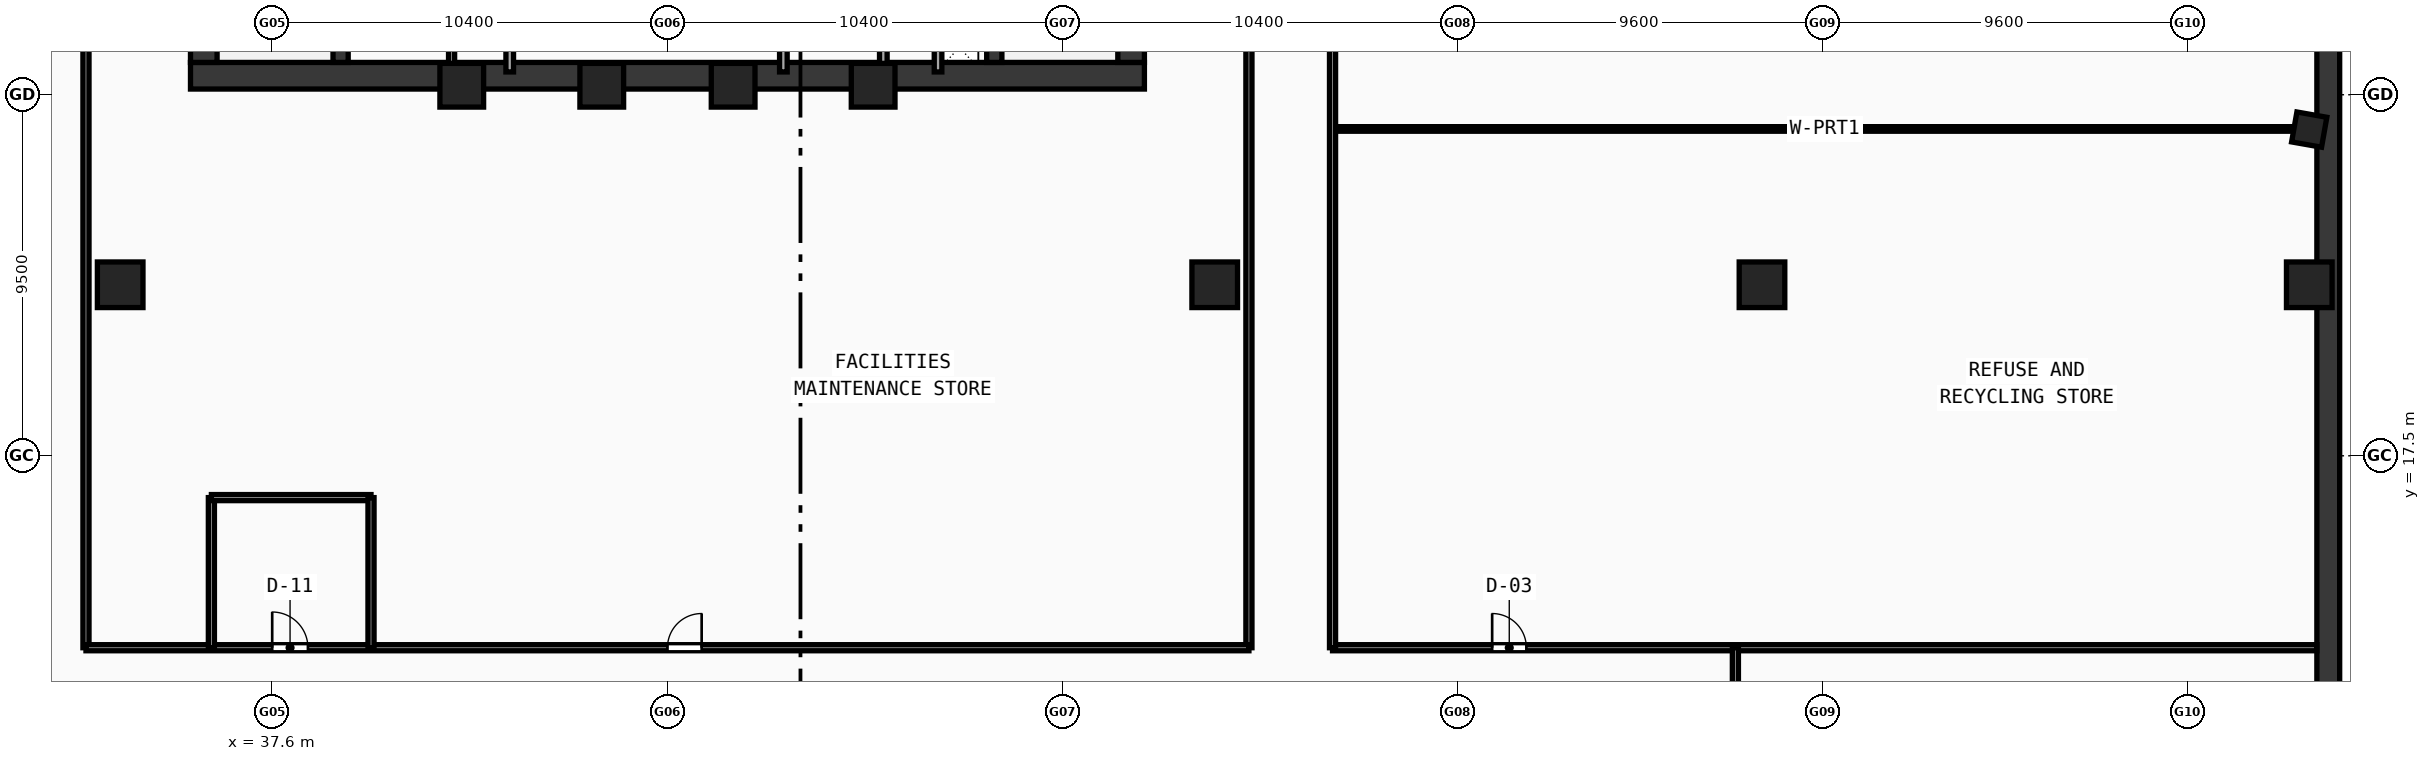
"""IFC4 building model, lengths in metres.
Left out: names, types, materials, properties, quantities, classifications, styles, units other than length and angle.
Written with IfcOpenShell. Run it as: python <this file> out.ifc"""

import sys

from ifc_helpers import new_model, si_unit, direction, frame, frame_2d, origin, origin_with_axes, origin_2d, place, context, subcontext, project, spatial, rectangle, hollow_rectangle, extrude, source, transform, mapped, element, fill, save


model = new_model("IFC4")
c1 = context("Model", 3, precision=1e-05, world=origin(), true_north=direction((0.0, 1.0)))
c2 = subcontext(c1, "Body", "Model", "MODEL_VIEW")
j1 = project(units=[si_unit("LENGTHUNIT", "METRE"), si_unit("PLANEANGLEUNIT", "RADIAN")], contexts=[c1])
p1 = place(None, origin())
s1 = spatial("IfcSite", under=j1, at=p1, CompositionType="ELEMENT")
p2 = place(p1, origin())
s2 = spatial("IfcBuilding", under=s1, at=p2, CompositionType="ELEMENT")
p3 = place(p2, frame((0.0, 0.0, -4.8)))
s3 = spatial("IfcBuildingStorey", under=s2, at=p3, CompositionType="ELEMENT", Elevation=-4.8)
p4 = place(p3, frame((91.7, 6.6, 0.0), z_axis=(0.0, 0.0, 1.0), x_axis=(0.0, 1.0, 0.0)))
e1 = element("IfcWall", 1, at=p4, inside=s3, PredefinedType="SHEAR", context=c2, shape_type="SweptSolid", body=[
    extrude(rectangle(XDim=82.8, YDim=0.6, at=frame_2d((41.4, 0.0))), origin(), (0.0, 0.0, 1.0), 4.52),
])
p5 = place(p3, frame((35.45, 27.5, 0.0), z_axis=(0.0, 0.0, 1.0), x_axis=(1.0, 0.0, 0.0)))
e2 = element("IfcWall", 2, at=p5, inside=s3, PredefinedType="SHEAR", context=c2, shape_type="SweptSolid", body=[
    extrude(rectangle(XDim=25.1, YDim=0.7, at=frame_2d((12.55, 0.0))), origin(), (0.0, 0.0, 1.0), 4.52),
])
for number, where, z_axis, x_axis in (
    (3, (35.8, 27.85, 0.0), (0.0, 0.0, 1.0), (0.0, 1.0, 0.0)),
    (4, (60.2, 27.85, 0.0), (0.0, 0.0, 1.0), (0.0, 1.0, 0.0)),
):
    element("IfcWall", number, at=place(p3, frame(where, z_axis=z_axis, x_axis=x_axis)), inside=s3, PredefinedType="SHEAR", context=c2, shape_type="SweptSolid", body=[
        extrude(rectangle(XDim=12.0, YDim=0.7, at=frame_2d((6.0, 0.0))), origin(), (0.0, 0.0, 1.0), 4.52),
    ])
p6 = place(p3, frame((39.4, 27.85, 0.0), z_axis=(0.0, 0.0, 1.0), x_axis=(0.0, 1.0, 0.0)))
e5 = element("IfcWall", 5, at=p6, inside=s3, PredefinedType="SHEAR", context=c2, shape_type="SweptSolid", body=[
    extrude(rectangle(XDim=12.0, YDim=0.4, at=frame_2d((6.0, 0.0))), origin(), (0.0, 0.0, 1.0), 4.52),
])
p7 = place(p6, frame((9.9, 0.0, 0.0)))
e6 = element("IfcOpeningElement", 6, at=p7, cuts=e5, PredefinedType="OPENING", context=c2, shape_type="SweptSolid", body=[
    extrude(rectangle(XDim=1.1, YDim=2.1, at=frame_2d((0.55, 1.05))), frame((0.0, 0.21, 0.0), z_axis=(0.0, -1.0, 0.0), x_axis=(1.0, 0.0, 0.0)), (0.0, 0.0, 1.0), 0.42),
])
p8 = place(p3, frame((56.6, 27.85, 0.0), z_axis=(0.0, 0.0, 1.0), x_axis=(0.0, 1.0, 0.0)))
e7 = element("IfcWall", 7, at=p8, inside=s3, PredefinedType="SHEAR", context=c2, shape_type="SweptSolid", body=[
    extrude(rectangle(XDim=12.0, YDim=0.4, at=frame_2d((6.0, 0.0))), origin(), (0.0, 0.0, 1.0), 4.52),
])
p9 = place(p8, frame((9.9, 0.0, 0.0)))
e8 = element("IfcOpeningElement", 8, at=p9, cuts=e7, PredefinedType="OPENING", context=c2, shape_type="SweptSolid", body=[
    extrude(rectangle(XDim=1.1, YDim=2.1, at=frame_2d((0.55, 1.05))), frame((0.0, 0.21, 0.0), z_axis=(0.0, -1.0, 0.0), x_axis=(1.0, 0.0, 0.0)), (0.0, 0.0, 1.0), 0.42),
])
m1 = source(origin(), c2, "Body", "SweptSolid", [
    extrude(hollow_rectangle(XDim=1.15, YDim=1.15, WallThickness=0.048, at=origin_2d()), origin(), (0.0, 0.0, 1.0), 4.82),
])
for number, where, z_axis, x_axis in (
    (9, (42.588, 27.25, -0.3), (0.0, 0.0, 1.0), (1.0, 0.0, 0.0)),
    (10, (46.272, 27.25, -0.3), (0.0, 0.0, 1.0), (1.0, 0.0, 0.0)),
    (11, (49.729, 27.25, -0.3), (0.0, 0.0, 1.0), (1.0, 0.0, 0.0)),
    (12, (53.412, 27.25, -0.3), (0.0, 0.0, 1.0), (1.0, 0.0, 0.0)),
):
    element("IfcColumn", number, at=place(p3, frame(where, z_axis=z_axis, x_axis=x_axis)), inside=s3, PredefinedType="COLUMN", context=c2, shape_type="MappedRepresentation", body=[
        mapped(m1, transform((0.0, 0.0, 0.0), scale=1.0)),
    ])
m2 = source(origin(), c2, "Body", "SweptSolid", [
    extrude(hollow_rectangle(XDim=1.2, YDim=1.2, WallThickness=0.05, at=origin_2d()), origin(), (0.0, 0.0, 1.0), 4.82),
])
for number, where, z_axis, x_axis in (
    (13, (33.6, 22.0, -0.3), (0.0, 0.0, 1.0), (1.0, 0.0, 0.0)),
    (14, (62.4, 22.0, -0.3), (0.0, 0.0, 1.0), (1.0, 0.0, 0.0)),
    (15, (76.8, 22.0, -0.3), (0.0, 0.0, 1.0), (1.0, 0.0, 0.0)),
    (16, (91.2, 22.0, -0.3), (0.0, 0.0, 1.0), (1.0, 0.0, 0.0)),
):
    element("IfcColumn", number, at=place(p3, frame(where, z_axis=z_axis, x_axis=x_axis)), inside=s3, PredefinedType="COLUMN", context=c2, shape_type="MappedRepresentation", body=[
        mapped(m2, transform((0.0, 0.0, 0.0), scale=1.0)),
    ])
m3 = source(origin(), c2, "Body", "SweptSolid", [
    extrude(hollow_rectangle(XDim=0.8, YDim=0.8, WallThickness=0.032, at=origin_2d()), origin(), (0.0, 0.0, 1.0), 4.82),
])
p10 = place(p3, frame((91.199, 26.083, -0.3), z_axis=(0.0, 0.0, 1.0), x_axis=(0.173648177667, 0.984807753012, 0.0)))
e17 = element("IfcColumn", 17, at=p10, inside=s3, PredefinedType="COLUMN", context=c2, shape_type="MappedRepresentation", body=[
    mapped(m3, transform((0.0, 0.0, 0.0), scale=1.0)),
])
p11 = place(p3, frame((43.85, 27.6, 0.0), z_axis=(0.0, 0.0, 1.0), x_axis=(0.0, 1.0, 0.0)))
e18 = element("IfcWall", 18, at=p11, inside=s3, PredefinedType="SOLIDWALL", context=c2, shape_type="SweptSolid", body=[
    extrude(rectangle(XDim=6.22, YDim=0.2, at=frame_2d((3.11, 0.0))), origin(), (0.0, 0.0, 1.0), 4.52),
])
p12 = place(p11, frame((2.25, 0.0, 0.0)))
e19 = element("IfcOpeningElement", 19, at=p12, cuts=e18, PredefinedType="OPENING", context=c2, shape_type="SweptSolid", body=[
    extrude(rectangle(XDim=1.05, YDim=2.1, at=frame_2d((0.525, 1.05))), frame((0.0, 0.11, 0.0), z_axis=(0.0, -1.0, 0.0), x_axis=(1.0, 0.0, 0.0)), (0.0, 0.0, 1.0), 0.22),
])
p13 = place(p3, frame((53.68, 27.6, 0.0), z_axis=(0.0, 0.0, 1.0), x_axis=(0.0, 1.0, 0.0)))
e20 = element("IfcWall", 20, at=p13, inside=s3, PredefinedType="SOLIDWALL", context=c2, shape_type="SweptSolid", body=[
    extrude(rectangle(XDim=9.05, YDim=0.2, at=frame_2d((4.525, 0.0))), origin(), (0.0, 0.0, 1.0), 4.52),
])
p14 = place(p13, frame((6.9, 0.0, 0.0)))
e21 = element("IfcOpeningElement", 21, at=p14, cuts=e20, PredefinedType="OPENING", context=c2, shape_type="SweptSolid", body=[
    extrude(rectangle(XDim=1.05, YDim=2.1, at=frame_2d((0.525, 1.05))), frame((0.0, 0.11, 0.0), z_axis=(0.0, -1.0, 0.0), x_axis=(1.0, 0.0, 0.0)), (0.0, 0.0, 1.0), 0.22),
])
for number, where, z_axis, x_axis in (
    (22, (51.05, 27.6, 0.0), (0.0, 0.0, 1.0), (0.0, 1.0, 0.0)),
    (23, (55.12, 27.6, 0.0), (0.0, 0.0, 1.0), (0.0, 1.0, 0.0)),
):
    element("IfcWall", number, at=place(p3, frame(where, z_axis=z_axis, x_axis=x_axis)), inside=s3, PredefinedType="SOLIDWALL", context=c2, shape_type="SweptSolid", body=[
        extrude(rectangle(XDim=2.12, YDim=0.2, at=frame_2d((1.06, 0.0))), origin(), (0.0, 0.0, 1.0), 4.52),
    ])
p15 = place(p3, frame((42.32, 27.6, 0.0), z_axis=(0.0, 0.0, 1.0), x_axis=(0.0, 1.0, 0.0)))
e24 = element("IfcWall", 24, at=p15, inside=s3, PredefinedType="PARTITIONING", context=c2, shape_type="SweptSolid", body=[
    extrude(rectangle(XDim=5.9, YDim=0.16, at=frame_2d((2.95, 0.0))), origin(), (0.0, 0.0, 1.0), 4.52),
])
p16 = place(p15, frame((1.1, 0.0, 0.0)))
e25 = element("IfcOpeningElement", 25, at=p16, cuts=e24, PredefinedType="OPENING", context=c2, shape_type="SweptSolid", body=[
    extrude(rectangle(XDim=0.9, YDim=2.1, at=frame_2d((0.45, 1.05))), frame((0.0, 0.09, 0.0), z_axis=(0.0, -1.0, 0.0), x_axis=(1.0, 0.0, 0.0)), (0.0, 0.0, 1.0), 0.18),
])
p17 = place(p15, frame((3.6, 0.0, 0.0)))
e26 = element("IfcOpeningElement", 26, at=p17, cuts=e24, PredefinedType="OPENING", context=c2, shape_type="SweptSolid", body=[
    extrude(rectangle(XDim=0.9, YDim=2.1, at=frame_2d((0.45, 1.05))), frame((0.0, 0.09, 0.0), z_axis=(0.0, -1.0, 0.0), x_axis=(1.0, 0.0, 0.0)), (0.0, 0.0, 1.0), 0.18),
])
p18 = place(p3, frame((65.5, 26.1, 0.0), z_axis=(0.0, 0.0, 1.0), x_axis=(1.0, 0.0, 0.0)))
e27 = element("IfcWall", 27, at=p18, inside=s3, PredefinedType="PARTITIONING", context=c2, shape_type="SweptSolid", body=[
    extrude(rectangle(XDim=25.9, YDim=0.12, at=frame_2d((12.95, 0.0))), origin(), (0.0, 0.0, 1.0), 3.62),
])
p19 = place(p3, frame((65.5, 12.45, 0.0), z_axis=(0.0, 0.0, 1.0), x_axis=(1.0, 0.0, 0.0)))
e28 = element("IfcWall", 28, at=p19, inside=s3, PredefinedType="PARTITIONING", context=c2, shape_type="SweptSolid", body=[
    extrude(rectangle(XDim=25.9, YDim=0.16, at=frame_2d((12.95, 0.0))), origin(), (0.0, 0.0, 1.0), 3.62),
])
p20 = place(p19, frame((4.2, 0.0, 0.0)))
e29 = element("IfcOpeningElement", 29, at=p20, cuts=e28, PredefinedType="OPENING", context=c2, shape_type="SweptSolid", body=[
    extrude(rectangle(XDim=0.9, YDim=2.1, at=frame_2d((0.45, 1.05))), frame((0.0, 0.09, 0.0), z_axis=(0.0, -1.0, 0.0), x_axis=(1.0, 0.0, 0.0)), (0.0, 0.0, 1.0), 0.18),
])
for number, where, z_axis, x_axis in (
    (30, (65.5, 12.45, 0.0), (0.0, 0.0, 1.0), (0.0, 1.0, 0.0)),
    (31, (32.7, 12.45, 0.0), (0.0, 0.0, 1.0), (0.0, 1.0, 0.0)),
    (32, (63.3, 12.45, 0.0), (0.0, 0.0, 1.0), (0.0, 1.0, 0.0)),
):
    element("IfcWall", number, at=place(p3, frame(where, z_axis=z_axis, x_axis=x_axis)), inside=s3, PredefinedType="PARTITIONING", context=c2, shape_type="SweptSolid", body=[
        extrude(rectangle(XDim=26.77, YDim=0.16, at=frame_2d((13.385, 0.0))), origin(), (0.0, 0.0, 1.0), 3.62),
    ])
p21 = place(p3, frame((32.7, 12.45, 0.0), z_axis=(0.0, 0.0, 1.0), x_axis=(1.0, 0.0, 0.0)))
e33 = element("IfcWall", 33, at=p21, inside=s3, PredefinedType="PARTITIONING", context=c2, shape_type="SweptSolid", body=[
    extrude(rectangle(XDim=30.6, YDim=0.16, at=frame_2d((15.3, 0.0))), origin(), (0.0, 0.0, 1.0), 3.62),
])
p22 = place(p21, frame((4.9, 0.0, 0.0)))
e34 = element("IfcOpeningElement", 34, at=p22, cuts=e33, PredefinedType="OPENING", context=c2, shape_type="SweptSolid", body=[
    extrude(rectangle(XDim=0.94, YDim=2.1, at=frame_2d((0.47, 1.05))), frame((0.0, 0.09, 0.0), z_axis=(0.0, -1.0, 0.0), x_axis=(1.0, 0.0, 0.0)), (0.0, 0.0, 1.0), 0.18),
])
p23 = place(p21, frame((15.3, 0.0, 0.0)))
e35 = element("IfcOpeningElement", 35, at=p23, cuts=e33, PredefinedType="OPENING", context=c2, shape_type="SweptSolid", body=[
    extrude(rectangle(XDim=0.9, YDim=2.1, at=frame_2d((0.45, 1.05))), frame((0.0, 0.09, 0.0), z_axis=(0.0, -1.0, 0.0), x_axis=(1.0, 0.0, 0.0)), (0.0, 0.0, 1.0), 0.18),
])
p24 = place(p3, frame((36.0, 12.45, 0.0), z_axis=(0.0, 0.0, 1.0), x_axis=(0.0, 1.0, 0.0)))
e36 = element("IfcWall", 36, at=p24, inside=s3, PredefinedType="PARTITIONING", context=c2, shape_type="SweptSolid", body=[
    extrude(rectangle(XDim=3.95, YDim=0.16, at=frame_2d((1.975, 0.0))), origin(), (0.0, 0.0, 1.0), 4.12),
])
p25 = place(p3, frame((36.0, 16.4, 0.0), z_axis=(0.0, 0.0, 1.0), x_axis=(1.0, 0.0, 0.0)))
e37 = element("IfcWall", 37, at=p25, inside=s3, PredefinedType="PARTITIONING", context=c2, shape_type="SweptSolid", body=[
    extrude(rectangle(XDim=4.2, YDim=0.16, at=frame_2d((2.1, 0.0))), origin(), (0.0, 0.0, 1.0), 4.52),
])
p26 = place(p3, frame((40.2, 12.45, 0.0), z_axis=(0.0, 0.0, 1.0), x_axis=(0.0, 1.0, 0.0)))
e38 = element("IfcWall", 38, at=p26, inside=s3, PredefinedType="PARTITIONING", context=c2, shape_type="SweptSolid", body=[
    extrude(rectangle(XDim=3.95, YDim=0.16, at=frame_2d((1.975, 0.0))), origin(), (0.0, 0.0, 1.0), 4.12),
])
p27 = place(p3, frame((76.1, 10.35, 0.0), z_axis=(0.0, 0.0, 1.0), x_axis=(0.0, 1.0, 0.0)))
e39 = element("IfcWall", 39, at=p27, inside=s3, PredefinedType="PARTITIONING", context=c2, shape_type="SweptSolid", body=[
    extrude(rectangle(XDim=2.1, YDim=0.16, at=frame_2d((1.05, 0.0))), origin(), (0.0, 0.0, 1.0), 4.52),
])
m4 = source(origin(), c2, "Body", "SweptSolid", [
    extrude(rectangle(XDim=0.9, YDim=2.1, at=frame_2d((0.45, 1.05))), frame((0.0, 0.025, 0.0), z_axis=(0.0, -1.0, 0.0), x_axis=(1.0, 0.0, 0.0)), (0.0, 0.0, 1.0), 0.05),
])
p28 = place(p20, origin_with_axes())
e40 = element("IfcDoor", 40, at=p28, inside=s3, OperationType="SINGLE_SWING_LEFT", PredefinedType="DOOR", context=c2, shape_type="MappedRepresentation", body=[
    mapped(m4, transform((0.0, 0.0, 0.0), scale=1.0)),
])
fill(e29, e40)
m5 = source(origin(), c2, "Body", "SweptSolid", [
    extrude(rectangle(XDim=0.94, YDim=2.1, at=frame_2d((0.47, 1.05))), frame((0.0, 0.025, 0.0), z_axis=(0.0, -1.0, 0.0), x_axis=(1.0, 0.0, 0.0)), (0.0, 0.0, 1.0), 0.05),
])
p29 = place(p22, origin_with_axes())
e41 = element("IfcDoor", 41, at=p29, inside=s3, OperationType="SINGLE_SWING_LEFT", PredefinedType="DOOR", context=c2, shape_type="MappedRepresentation", body=[
    mapped(m5, transform((0.0, 0.0, 0.0), scale=1.0)),
])
fill(e34, e41)
p30 = place(p23, origin_with_axes())
e42 = element("IfcDoor", 42, at=p30, inside=s3, OperationType="SINGLE_SWING_RIGHT", PredefinedType="DOOR", context=c2, shape_type="MappedRepresentation", body=[
    mapped(m4, transform((0.0, 0.0, 0.0), scale=1.0)),
])
fill(e35, e42)
save(model, sys.argv[1])
